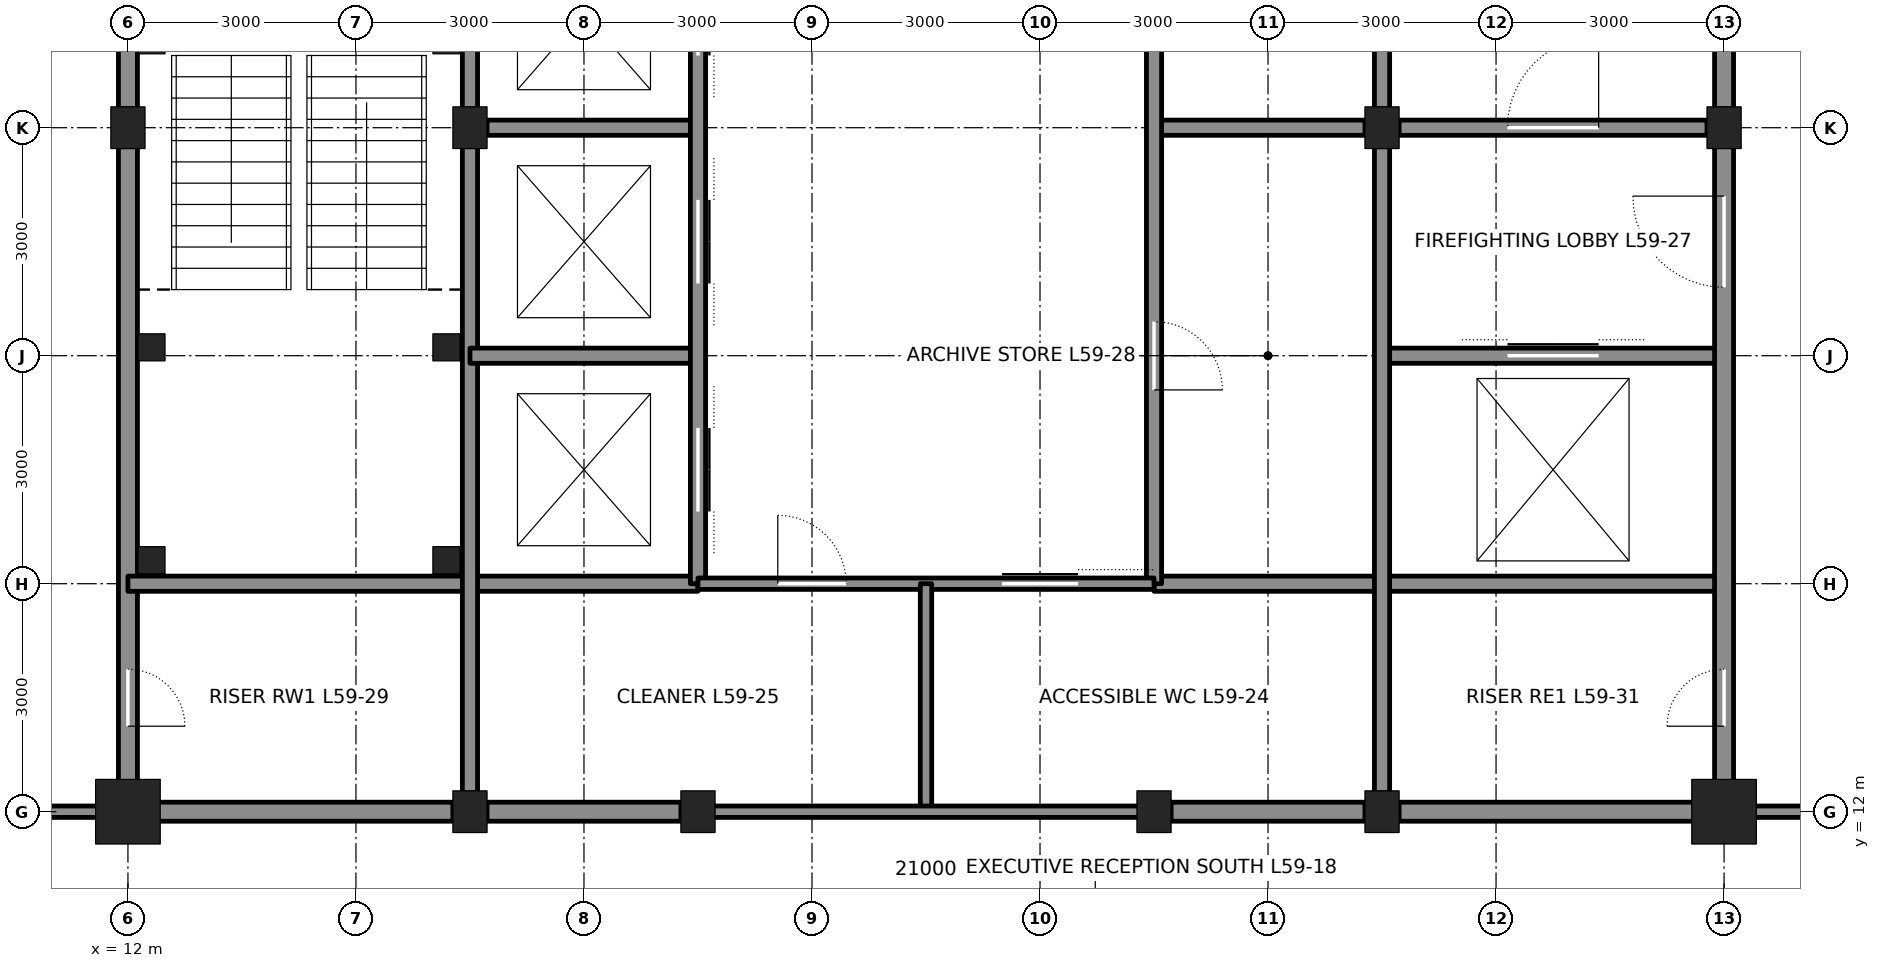
"""IFC4 building model, lengths in metres.
Left out: names, types, materials, properties, quantities, classifications, styles, units other than length and angle.
Written with IfcOpenShell. Run it as: python <this file> out.ifc"""

import sys

from ifc_helpers import new_model, si_unit, direction, frame, frame_2d, origin, origin_2d, place, context, subcontext, project, spatial, rectangle, hollow_rectangle, i_section, extrude, element, fill, save


model = new_model("IFC4")
c1 = context("Model", 3, precision=1e-05, world=origin(), true_north=direction((0.0, 1.0)))
c2 = subcontext(c1, "Body", "Model", "MODEL_VIEW")
j1 = project(units=[si_unit("LENGTHUNIT", "METRE"), si_unit("PLANEANGLEUNIT", "RADIAN")], contexts=[c1])
p1 = place(None, origin())
s1 = spatial("IfcSite", under=j1, at=p1, CompositionType="ELEMENT")
p2 = place(p1, origin())
s2 = spatial("IfcBuilding", under=s1, at=p2, CompositionType="ELEMENT")
p3 = place(p2, frame((0.0, 0.0, 266.4)))
s3 = spatial("IfcBuildingStorey", under=s2, at=p3, CompositionType="ELEMENT", Elevation=266.4)
p4 = place(p3, frame((12.0, 12.0, 0.0), z_axis=(0.0, 0.0, 1.0), x_axis=(1.0, 0.0, 0.0)))
e1 = element("IfcColumn", 1, at=p4, inside=s3, PredefinedType="COLUMN", context=c2, shape_type="SweptSolid", body=[
    extrude(hollow_rectangle(XDim=0.85, YDim=0.85, WallThickness=0.085, at=origin_2d()), origin(), (0.0, 0.0, 1.0), 4.2),
])
for number, where, z_axis, x_axis in (
    (2, (16.5, 12.0, 0.0), (0.0, 0.0, 1.0), (1.0, 0.0, 0.0)),
    (3, (19.5, 12.0, 0.0), (0.0, 0.0, 1.0), (1.0, 0.0, 0.0)),
    (4, (25.5, 12.0, 0.0), (0.0, 0.0, 1.0), (1.0, 0.0, 0.0)),
    (5, (28.5, 12.0, 0.0), (0.0, 0.0, 1.0), (1.0, 0.0, 0.0)),
):
    element("IfcColumn", number, at=place(p3, frame(where, z_axis=z_axis, x_axis=x_axis)), inside=s3, PredefinedType="COLUMN", context=c2, shape_type="SweptSolid", body=[
        extrude(i_section(OverallWidth=0.449, OverallDepth=0.549, WebThickness=0.072, FlangeThickness=0.115, at=origin_2d()), origin(), (0.0, 0.0, 1.0), 4.2),
    ])
p5 = place(p3, frame((33.0, 12.0, 0.0), z_axis=(0.0, 0.0, 1.0), x_axis=(1.0, 0.0, 0.0)))
e6 = element("IfcColumn", 6, at=p5, inside=s3, PredefinedType="COLUMN", context=c2, shape_type="SweptSolid", body=[
    extrude(hollow_rectangle(XDim=0.85, YDim=0.85, WallThickness=0.085, at=origin_2d()), origin(), (0.0, 0.0, 1.0), 4.2),
])
for number, where, z_axis, x_axis in (
    (7, (12.0, 21.0, 0.0), (0.0, 0.0, 1.0), (1.0, 0.0, 0.0)),
    (8, (33.0, 21.0, 0.0), (0.0, 0.0, 1.0), (1.0, 0.0, 0.0)),
    (9, (16.5, 21.0, 0.0), (0.0, 0.0, 1.0), (1.0, 0.0, 0.0)),
    (10, (28.5, 21.0, 0.0), (0.0, 0.0, 1.0), (1.0, 0.0, 0.0)),
):
    element("IfcColumn", number, at=place(p3, frame(where, z_axis=z_axis, x_axis=x_axis)), inside=s3, PredefinedType="COLUMN", context=c2, shape_type="SweptSolid", body=[
        extrude(i_section(OverallWidth=0.449, OverallDepth=0.549, WebThickness=0.072, FlangeThickness=0.115, at=origin_2d()), origin(), (0.0, 0.0, 1.0), 4.2),
    ])
p6 = place(p3, frame((12.0, 12.25, 0.0), z_axis=(0.0, 0.0, 1.0), x_axis=(0.0, 1.0, 0.0)))
e11 = element("IfcWall", 11, at=p6, inside=s3, PredefinedType="SOLIDWALL", context=c2, shape_type="SweptSolid", body=[
    extrude(rectangle(XDim=8.5, YDim=0.25, at=frame_2d((4.25, 0.0))), origin(), (0.0, 0.0, 1.0), 3.113),
])
p7 = place(p6, frame((0.875, 0.0, 0.0)))
e12 = element("IfcOpeningElement", 12, at=p7, cuts=e11, PredefinedType="OPENING", context=c2, shape_type="SweptSolid", body=[
    extrude(rectangle(XDim=0.75, YDim=2.1, at=frame_2d((0.375, 1.05))), frame((0.0, 0.135, 0.0), z_axis=(0.0, -1.0, 0.0), x_axis=(1.0, 0.0, 0.0)), (0.0, 0.0, 1.0), 0.27),
])
p8 = place(p3, frame((12.0, 21.25, 0.0), z_axis=(0.0, 0.0, 1.0), x_axis=(0.0, 1.0, 0.0)))
e13 = element("IfcWall", 13, at=p8, inside=s3, PredefinedType="SOLIDWALL", context=c2, shape_type="SweptSolid", body=[
    extrude(rectangle(XDim=2.5, YDim=0.25, at=frame_2d((1.25, 0.0))), origin(), (0.0, 0.0, 1.0), 3.113),
])
p9 = place(p3, frame((12.25, 12.0, 0.0), z_axis=(0.0, 0.0, 1.0), x_axis=(1.0, 0.0, 0.0)))
e14 = element("IfcWall", 14, at=p9, inside=s3, PredefinedType="SOLIDWALL", context=c2, shape_type="SweptSolid", body=[
    extrude(rectangle(XDim=4.025, YDim=0.25, at=frame_2d((2.013, 0.0))), origin(), (0.0, 0.0, 1.0), 3.182),
])
for number, where, z_axis, x_axis in (
    (15, (16.725, 12.0, 0.0), (0.0, 0.0, 1.0), (1.0, 0.0, 0.0)),
    (16, (25.725, 12.0, 0.0), (0.0, 0.0, 1.0), (1.0, 0.0, 0.0)),
):
    element("IfcWall", number, at=place(p3, frame(where, z_axis=z_axis, x_axis=x_axis)), inside=s3, PredefinedType="SOLIDWALL", context=c2, shape_type="SweptSolid", body=[
        extrude(rectangle(XDim=2.55, YDim=0.25, at=frame_2d((1.275, 0.0))), origin(), (0.0, 0.0, 1.0), 3.182),
    ])
p10 = place(p3, frame((28.725, 12.0, 0.0), z_axis=(0.0, 0.0, 1.0), x_axis=(1.0, 0.0, 0.0)))
e17 = element("IfcWall", 17, at=p10, inside=s3, PredefinedType="SOLIDWALL", context=c2, shape_type="SweptSolid", body=[
    extrude(rectangle(XDim=4.025, YDim=0.25, at=frame_2d((2.013, 0.0))), origin(), (0.0, 0.0, 1.0), 3.182),
])
for number, where, z_axis, x_axis in (
    (18, (12.0, 15.0, 0.0), (0.0, 0.0, 1.0), (1.0, 0.0, 0.0)),
    (19, (25.5, 15.0, 0.0), (0.0, 0.0, 1.0), (1.0, 0.0, 0.0)),
):
    element("IfcWall", number, at=place(p3, frame(where, z_axis=z_axis, x_axis=x_axis)), inside=s3, PredefinedType="SOLIDWALL", context=c2, shape_type="SweptSolid", body=[
        extrude(rectangle(XDim=7.5, YDim=0.2, at=frame_2d((3.75, 0.0))), origin(), (0.0, 0.0, 1.0), 4.04),
    ])
p11 = place(p3, frame((16.5, 12.25, 0.0), z_axis=(0.0, 0.0, 1.0), x_axis=(0.0, 1.0, 0.0)))
e20 = element("IfcWall", 20, at=p11, inside=s3, PredefinedType="SOLIDWALL", context=c2, shape_type="SweptSolid", body=[
    extrude(rectangle(XDim=8.5, YDim=0.2, at=frame_2d((4.25, 0.0))), origin(), (0.0, 0.0, 1.0), 3.113),
])
p12 = place(p3, frame((16.5, 21.25, 0.0), z_axis=(0.0, 0.0, 1.0), x_axis=(0.0, 1.0, 0.0)))
e21 = element("IfcWall", 21, at=p12, inside=s3, PredefinedType="SOLIDWALL", context=c2, shape_type="SweptSolid", body=[
    extrude(rectangle(XDim=2.5, YDim=0.2, at=frame_2d((1.25, 0.0))), origin(), (0.0, 0.0, 1.0), 3.113),
])
p13 = place(p3, frame((16.5, 18.0, 0.0), z_axis=(0.0, 0.0, 1.0), x_axis=(1.0, 0.0, 0.0)))
e22 = element("IfcWall", 22, at=p13, inside=s3, PredefinedType="SOLIDWALL", context=c2, shape_type="SweptSolid", body=[
    extrude(rectangle(XDim=3.0, YDim=0.2, at=frame_2d((1.5, 0.0))), origin(), (0.0, 0.0, 1.0), 4.04),
])
p14 = place(p3, frame((28.5, 18.0, 0.0), z_axis=(0.0, 0.0, 1.0), x_axis=(1.0, 0.0, 0.0)))
e23 = element("IfcWall", 23, at=p14, inside=s3, PredefinedType="SOLIDWALL", context=c2, shape_type="SweptSolid", body=[
    extrude(rectangle(XDim=4.5, YDim=0.2, at=frame_2d((2.25, 0.0))), origin(), (0.0, 0.0, 1.0), 4.04),
])
p15 = place(p14, frame((1.65, 0.0, 0.0)))
e24 = element("IfcOpeningElement", 24, at=p15, cuts=e23, PredefinedType="OPENING", context=c2, shape_type="SweptSolid", body=[
    extrude(rectangle(XDim=1.2, YDim=2.1, at=frame_2d((0.6, 1.05))), frame((0.0, 0.11, 0.0), z_axis=(0.0, -1.0, 0.0), x_axis=(1.0, 0.0, 0.0)), (0.0, 0.0, 1.0), 0.22),
])
for number, where, z_axis, x_axis in (
    (25, (16.725, 21.0, 0.0), (0.0, 0.0, 1.0), (1.0, 0.0, 0.0)),
    (26, (25.5, 21.0, 0.0), (0.0, 0.0, 1.0), (1.0, 0.0, 0.0)),
):
    element("IfcWall", number, at=place(p3, frame(where, z_axis=z_axis, x_axis=x_axis)), inside=s3, PredefinedType="SOLIDWALL", context=c2, shape_type="SweptSolid", body=[
        extrude(rectangle(XDim=2.775, YDim=0.2, at=frame_2d((1.388, 0.0))), origin(), (0.0, 0.0, 1.0), 3.09),
    ])
p16 = place(p3, frame((28.725, 21.0, 0.0), z_axis=(0.0, 0.0, 1.0), x_axis=(1.0, 0.0, 0.0)))
e27 = element("IfcWall", 27, at=p16, inside=s3, PredefinedType="SOLIDWALL", context=c2, shape_type="SweptSolid", body=[
    extrude(rectangle(XDim=4.05, YDim=0.2, at=frame_2d((2.025, 0.0))), origin(), (0.0, 0.0, 1.0), 3.09),
])
p17 = place(p16, frame((1.425, 0.0, 0.0)))
e28 = element("IfcOpeningElement", 28, at=p17, cuts=e27, PredefinedType="OPENING", context=c2, shape_type="SweptSolid", body=[
    extrude(rectangle(XDim=1.2, YDim=2.1, at=frame_2d((0.6, 1.05))), frame((0.0, 0.11, 0.0), z_axis=(0.0, -1.0, 0.0), x_axis=(1.0, 0.0, 0.0)), (0.0, 0.0, 1.0), 0.22),
])
p18 = place(p3, frame((19.5, 15.0, 0.0), z_axis=(0.0, 0.0, 1.0), x_axis=(0.0, 1.0, 0.0)))
e29 = element("IfcWall", 29, at=p18, inside=s3, PredefinedType="SOLIDWALL", context=c2, shape_type="SweptSolid", body=[
    extrude(rectangle(XDim=12.0, YDim=0.2, at=frame_2d((6.0, 0.0))), origin(), (0.0, 0.0, 1.0), 3.065),
])
p19 = place(p18, frame((0.95, 0.0, 0.0)))
e30 = element("IfcOpeningElement", 30, at=p19, cuts=e29, PredefinedType="OPENING", context=c2, shape_type="SweptSolid", body=[
    extrude(rectangle(XDim=1.1, YDim=2.1, at=frame_2d((0.55, 1.05))), frame((0.0, 0.11, 0.0), z_axis=(0.0, -1.0, 0.0), x_axis=(1.0, 0.0, 0.0)), (0.0, 0.0, 1.0), 0.22),
])
p20 = place(p18, frame((3.95, 0.0, 0.0)))
e31 = element("IfcOpeningElement", 31, at=p20, cuts=e29, PredefinedType="OPENING", context=c2, shape_type="SweptSolid", body=[
    extrude(rectangle(XDim=1.1, YDim=2.1, at=frame_2d((0.55, 1.05))), frame((0.0, 0.11, 0.0), z_axis=(0.0, -1.0, 0.0), x_axis=(1.0, 0.0, 0.0)), (0.0, 0.0, 1.0), 0.22),
])
p21 = place(p18, frame((6.95, 0.0, 0.0)))
e32 = element("IfcOpeningElement", 32, at=p21, cuts=e29, PredefinedType="OPENING", context=c2, shape_type="SweptSolid", body=[
    extrude(rectangle(XDim=1.1, YDim=2.1, at=frame_2d((0.55, 1.05))), frame((0.0, 0.11, 0.0), z_axis=(0.0, -1.0, 0.0), x_axis=(1.0, 0.0, 0.0)), (0.0, 0.0, 1.0), 0.22),
])
p22 = place(p18, frame((9.95, 0.0, 0.0)))
e33 = element("IfcOpeningElement", 33, at=p22, cuts=e29, PredefinedType="OPENING", context=c2, shape_type="SweptSolid", body=[
    extrude(rectangle(XDim=1.1, YDim=2.1, at=frame_2d((0.55, 1.05))), frame((0.0, 0.11, 0.0), z_axis=(0.0, -1.0, 0.0), x_axis=(1.0, 0.0, 0.0)), (0.0, 0.0, 1.0), 0.22),
])
p23 = place(p3, frame((25.5, 15.0, 0.0), z_axis=(0.0, 0.0, 1.0), x_axis=(0.0, 1.0, 0.0)))
e34 = element("IfcWall", 34, at=p23, inside=s3, PredefinedType="SOLIDWALL", context=c2, shape_type="SweptSolid", body=[
    extrude(rectangle(XDim=12.0, YDim=0.2, at=frame_2d((6.0, 0.0))), origin(), (0.0, 0.0, 1.0), 3.065),
])
p24 = place(p23, frame((2.55, 0.0, 0.0)))
e35 = element("IfcOpeningElement", 35, at=p24, cuts=e34, PredefinedType="OPENING", context=c2, shape_type="SweptSolid", body=[
    extrude(rectangle(XDim=0.9, YDim=2.1, at=frame_2d((0.45, 1.05))), frame((0.0, 0.11, 0.0), z_axis=(0.0, -1.0, 0.0), x_axis=(1.0, 0.0, 0.0)), (0.0, 0.0, 1.0), 0.22),
])
p25 = place(p3, frame((28.5, 12.25, 0.0), z_axis=(0.0, 0.0, 1.0), x_axis=(0.0, 1.0, 0.0)))
e36 = element("IfcWall", 36, at=p25, inside=s3, PredefinedType="SOLIDWALL", context=c2, shape_type="SweptSolid", body=[
    extrude(rectangle(XDim=8.5, YDim=0.2, at=frame_2d((4.25, 0.0))), origin(), (0.0, 0.0, 1.0), 3.113),
])
p26 = place(p3, frame((28.5, 21.25, 0.0), z_axis=(0.0, 0.0, 1.0), x_axis=(0.0, 1.0, 0.0)))
e37 = element("IfcWall", 37, at=p26, inside=s3, PredefinedType="SOLIDWALL", context=c2, shape_type="SweptSolid", body=[
    extrude(rectangle(XDim=2.5, YDim=0.2, at=frame_2d((1.25, 0.0))), origin(), (0.0, 0.0, 1.0), 3.113),
])
p27 = place(p3, frame((33.0, 12.25, 0.0), z_axis=(0.0, 0.0, 1.0), x_axis=(0.0, 1.0, 0.0)))
e38 = element("IfcWall", 38, at=p27, inside=s3, PredefinedType="SOLIDWALL", context=c2, shape_type="SweptSolid", body=[
    extrude(rectangle(XDim=8.5, YDim=0.25, at=frame_2d((4.25, 0.0))), origin(), (0.0, 0.0, 1.0), 3.113),
])
p28 = place(p27, frame((6.65, 0.0, 0.0)))
e39 = element("IfcOpeningElement", 39, at=p28, cuts=e38, PredefinedType="OPENING", context=c2, shape_type="SweptSolid", body=[
    extrude(rectangle(XDim=1.2, YDim=2.1, at=frame_2d((0.6, 1.05))), frame((0.0, 0.135, 0.0), z_axis=(0.0, -1.0, 0.0), x_axis=(1.0, 0.0, 0.0)), (0.0, 0.0, 1.0), 0.27),
])
p29 = place(p27, frame((0.875, 0.0, 0.0)))
e40 = element("IfcOpeningElement", 40, at=p29, cuts=e38, PredefinedType="OPENING", context=c2, shape_type="SweptSolid", body=[
    extrude(rectangle(XDim=0.75, YDim=2.1, at=frame_2d((0.375, 1.05))), frame((0.0, 0.135, 0.0), z_axis=(0.0, -1.0, 0.0), x_axis=(1.0, 0.0, 0.0)), (0.0, 0.0, 1.0), 0.27),
])
p30 = place(p3, frame((33.0, 21.25, 0.0), z_axis=(0.0, 0.0, 1.0), x_axis=(0.0, 1.0, 0.0)))
e41 = element("IfcWall", 41, at=p30, inside=s3, PredefinedType="SOLIDWALL", context=c2, shape_type="SweptSolid", body=[
    extrude(rectangle(XDim=2.5, YDim=0.25, at=frame_2d((1.25, 0.0))), origin(), (0.0, 0.0, 1.0), 3.113),
])
p31 = place(p3, frame((19.5, 15.0, 0.0), z_axis=(0.0, 0.0, 1.0), x_axis=(1.0, 0.0, 0.0)))
e42 = element("IfcWall", 42, at=p31, inside=s3, PredefinedType="PARTITIONING", context=c2, shape_type="SweptSolid", body=[
    extrude(rectangle(XDim=6.0, YDim=0.15, at=frame_2d((3.0, 0.0))), origin(), (0.0, 0.0, 1.0), 4.04),
])
p32 = place(p31, frame((4.0, 0.0, 0.0)))
e43 = element("IfcOpeningElement", 43, at=p32, cuts=e42, PredefinedType="OPENING", context=c2, shape_type="SweptSolid", body=[
    extrude(rectangle(XDim=1.0, YDim=2.1, at=frame_2d((0.5, 1.05))), frame((0.0, 0.085, 0.0), z_axis=(0.0, -1.0, 0.0), x_axis=(1.0, 0.0, 0.0)), (0.0, 0.0, 1.0), 0.17),
])
p33 = place(p31, frame((1.05, 0.0, 0.0)))
e44 = element("IfcOpeningElement", 44, at=p33, cuts=e42, PredefinedType="OPENING", context=c2, shape_type="SweptSolid", body=[
    extrude(rectangle(XDim=0.9, YDim=2.1, at=frame_2d((0.45, 1.05))), frame((0.0, 0.085, 0.0), z_axis=(0.0, -1.0, 0.0), x_axis=(1.0, 0.0, 0.0)), (0.0, 0.0, 1.0), 0.17),
])
p34 = place(p3, frame((22.5, 15.0, 0.0), z_axis=(0.0, 0.0, 1.0), x_axis=(0.0, -1.0, 0.0)))
e45 = element("IfcWall", 45, at=p34, inside=s3, PredefinedType="PARTITIONING", context=c2, shape_type="SweptSolid", body=[
    extrude(rectangle(XDim=3.0, YDim=0.15, at=frame_2d((1.5, 0.0))), origin(), (0.0, 0.0, 1.0), 4.04),
])
p35 = place(p3, frame((19.5, 12.0, 0.0), z_axis=(0.0, 0.0, 1.0), x_axis=(1.0, 0.0, 0.0)))
e46 = element("IfcWall", 46, at=p35, inside=s3, PredefinedType="PARTITIONING", context=c2, shape_type="SweptSolid", body=[
    extrude(rectangle(XDim=6.0, YDim=0.15, at=frame_2d((3.0, 0.0))), origin(), (0.0, 0.0, 1.0), 3.182),
])
for number, where, z_axis, x_axis in (
    (47, (10.2, 12.0, 0.0), (0.0, 0.0, 1.0), (1.0, 0.0, 0.0)),
    (48, (33.0, 12.0, 0.0), (0.0, 0.0, 1.0), (1.0, 0.0, 0.0)),
):
    element("IfcWall", number, at=place(p3, frame(where, z_axis=z_axis, x_axis=x_axis)), inside=s3, PredefinedType="PARTITIONING", context=c2, shape_type="SweptSolid", body=[
        extrude(rectangle(XDim=1.8, YDim=0.15, at=frame_2d((0.9, 0.0))), origin(), (0.0, 0.0, 1.0), 3.271),
    ])
for number, where, z_axis, x_axis in (
    (49, (12.31, 15.31, 0.0), (0.0, 0.0, 1.0), (1.0, 0.0, 0.0)),
    (50, (16.19, 15.31, 0.0), (0.0, 0.0, 1.0), (1.0, 0.0, 0.0)),
    (51, (12.31, 18.11, 0.0), (0.0, 0.0, 1.0), (1.0, 0.0, 0.0)),
    (52, (16.19, 18.11, 0.0), (0.0, 0.0, 1.0), (1.0, 0.0, 0.0)),
    (53, (12.31, 22.15, 0.0), (0.0, 0.0, 1.0), (1.0, 0.0, 0.0)),
    (54, (16.19, 22.15, 0.0), (0.0, 0.0, 1.0), (1.0, 0.0, 0.0)),
):
    element("IfcColumn", number, at=place(p3, frame(where, z_axis=z_axis, x_axis=x_axis)), inside=s3, PredefinedType="COLUMN", context=c2, shape_type="SweptSolid", body=[
        extrude(hollow_rectangle(XDim=0.356, YDim=0.356, WallThickness=0.009, at=origin_2d()), origin(), (0.0, 0.0, 1.0), 4.2),
    ])
p36 = place(p17, origin())
e55 = element("IfcDoor", 55, at=p36, inside=s3, OperationType="SINGLE_SWING_RIGHT", PredefinedType="DOOR", context=c2, shape_type="SweptSolid", body=[
    extrude(rectangle(XDim=1.2, YDim=2.1, at=frame_2d((0.6, 1.05))), frame((0.0, 0.025, 0.0), z_axis=(0.0, -1.0, 0.0), x_axis=(1.0, 0.0, 0.0)), (0.0, 0.0, 1.0), 0.05),
])
fill(e28, e55)
p37 = place(p28, origin())
e56 = element("IfcDoor", 56, at=p37, inside=s3, OperationType="SINGLE_SWING_RIGHT", PredefinedType="DOOR", context=c2, shape_type="SweptSolid", body=[
    extrude(rectangle(XDim=1.2, YDim=2.1, at=frame_2d((0.6, 1.05))), frame((0.0, 0.025, 0.0), z_axis=(0.0, -1.0, 0.0), x_axis=(1.0, 0.0, 0.0)), (0.0, 0.0, 1.0), 0.05),
])
fill(e39, e56)
p38 = place(p15, origin())
e57 = element("IfcDoor", 57, at=p38, inside=s3, OperationType="DOUBLE_DOOR_SLIDING", PredefinedType="DOOR", context=c2, shape_type="SweptSolid", body=[
    extrude(rectangle(XDim=1.2, YDim=2.1, at=frame_2d((0.6, 1.05))), frame((0.0, 0.025, 0.0), z_axis=(0.0, -1.0, 0.0), x_axis=(1.0, 0.0, 0.0)), (0.0, 0.0, 1.0), 0.05),
])
fill(e24, e57)
p39 = place(p7, frame((0.75, 0.0, 0.0), z_axis=(0.0, 0.0, 1.0), x_axis=(-1.0, 0.0, 0.0)))
e58 = element("IfcDoor", 58, at=p39, inside=s3, OperationType="SINGLE_SWING_RIGHT", PredefinedType="DOOR", context=c2, shape_type="SweptSolid", body=[
    extrude(rectangle(XDim=0.75, YDim=2.1, at=frame_2d((0.375, 1.05))), frame((0.0, 0.025, 0.0), z_axis=(0.0, -1.0, 0.0), x_axis=(1.0, 0.0, 0.0)), (0.0, 0.0, 1.0), 0.05),
])
fill(e12, e58)
p40 = place(p29, origin())
e59 = element("IfcDoor", 59, at=p40, inside=s3, OperationType="SINGLE_SWING_LEFT", PredefinedType="DOOR", context=c2, shape_type="SweptSolid", body=[
    extrude(rectangle(XDim=0.75, YDim=2.1, at=frame_2d((0.375, 1.05))), frame((0.0, 0.025, 0.0), z_axis=(0.0, -1.0, 0.0), x_axis=(1.0, 0.0, 0.0)), (0.0, 0.0, 1.0), 0.05),
])
fill(e40, e59)
p41 = place(p32, origin())
e60 = element("IfcDoor", 60, at=p41, inside=s3, OperationType="SLIDING_TO_LEFT", PredefinedType="DOOR", context=c2, shape_type="SweptSolid", body=[
    extrude(rectangle(XDim=1.0, YDim=2.1, at=frame_2d((0.5, 1.05))), frame((0.0, 0.025, 0.0), z_axis=(0.0, -1.0, 0.0), x_axis=(1.0, 0.0, 0.0)), (0.0, 0.0, 1.0), 0.05),
])
fill(e43, e60)
p42 = place(p24, frame((0.9, 0.0, 0.0), z_axis=(0.0, 0.0, 1.0), x_axis=(-1.0, 0.0, 0.0)))
e61 = element("IfcDoor", 61, at=p42, inside=s3, OperationType="SINGLE_SWING_RIGHT", PredefinedType="DOOR", context=c2, shape_type="SweptSolid", body=[
    extrude(rectangle(XDim=0.9, YDim=2.1, at=frame_2d((0.45, 1.05))), frame((0.0, 0.025, 0.0), z_axis=(0.0, -1.0, 0.0), x_axis=(1.0, 0.0, 0.0)), (0.0, 0.0, 1.0), 0.05),
])
fill(e35, e61)
p43 = place(p33, origin())
e62 = element("IfcDoor", 62, at=p43, inside=s3, OperationType="SINGLE_SWING_LEFT", PredefinedType="DOOR", context=c2, shape_type="SweptSolid", body=[
    extrude(rectangle(XDim=0.9, YDim=2.1, at=frame_2d((0.45, 1.05))), frame((0.0, 0.025, 0.0), z_axis=(0.0, -1.0, 0.0), x_axis=(1.0, 0.0, 0.0)), (0.0, 0.0, 1.0), 0.05),
])
fill(e44, e62)
p44 = place(p19, origin())
e63 = element("IfcDoor", 63, at=p44, inside=s3, OperationType="DOUBLE_DOOR_SLIDING", PredefinedType="DOOR", context=c2, shape_type="SweptSolid", body=[
    extrude(rectangle(XDim=1.1, YDim=2.1, at=frame_2d((0.55, 1.05))), frame((0.0, 0.025, 0.0), z_axis=(0.0, -1.0, 0.0), x_axis=(1.0, 0.0, 0.0)), (0.0, 0.0, 1.0), 0.05),
])
fill(e30, e63)
p45 = place(p20, origin())
e64 = element("IfcDoor", 64, at=p45, inside=s3, OperationType="DOUBLE_DOOR_SLIDING", PredefinedType="DOOR", context=c2, shape_type="SweptSolid", body=[
    extrude(rectangle(XDim=1.1, YDim=2.1, at=frame_2d((0.55, 1.05))), frame((0.0, 0.025, 0.0), z_axis=(0.0, -1.0, 0.0), x_axis=(1.0, 0.0, 0.0)), (0.0, 0.0, 1.0), 0.05),
])
fill(e31, e64)
p46 = place(p21, origin())
e65 = element("IfcDoor", 65, at=p46, inside=s3, OperationType="DOUBLE_DOOR_SLIDING", PredefinedType="DOOR", context=c2, shape_type="SweptSolid", body=[
    extrude(rectangle(XDim=1.1, YDim=2.1, at=frame_2d((0.55, 1.05))), frame((0.0, 0.025, 0.0), z_axis=(0.0, -1.0, 0.0), x_axis=(1.0, 0.0, 0.0)), (0.0, 0.0, 1.0), 0.05),
])
fill(e32, e65)
save(model, sys.argv[1])
